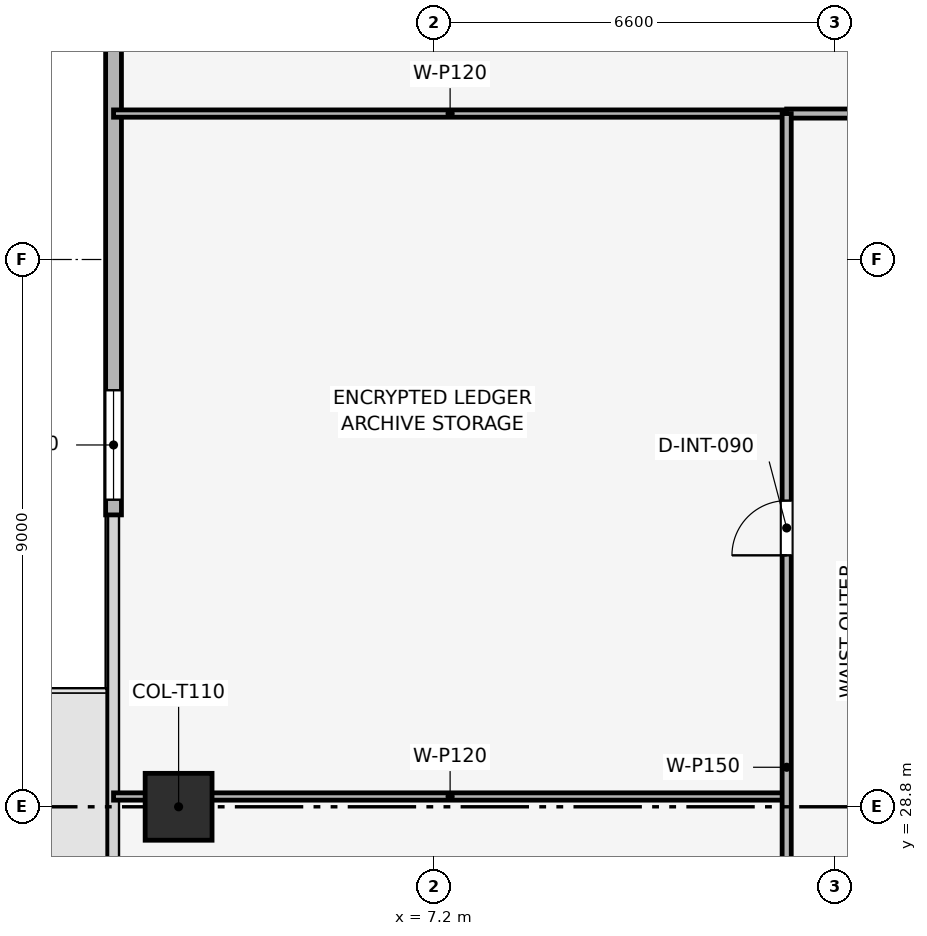
"""IFC4 building model, lengths in metres.
Left out: names, types, materials, properties, quantities, classifications, styles, units other than length and angle.
Written with IfcOpenShell. Run it as: python <this file> out.ifc"""

import sys

from ifc_helpers import new_model, si_unit, direction, frame, frame_2d, origin, origin_2d, place, context, subcontext, project, spatial, rectangle, extrude, element, fill, save


model = new_model("IFC4")
c1 = context("Model", 3, precision=1e-05, world=origin(), true_north=direction((0.0, 1.0)))
c2 = subcontext(c1, "Body", "Model", "MODEL_VIEW")
j1 = project(units=[si_unit("LENGTHUNIT", "METRE"), si_unit("PLANEANGLEUNIT", "RADIAN")], contexts=[c1])
p1 = place(None, origin())
s1 = spatial("IfcSite", under=j1, at=p1, CompositionType="ELEMENT")
p2 = place(p1, origin())
s2 = spatial("IfcBuilding", under=s1, at=p2, CompositionType="ELEMENT")
p3 = place(p2, frame((0.0, 0.0, 237.45)))
s3 = spatial("IfcBuildingStorey", under=s2, at=p3, CompositionType="ELEMENT", Elevation=237.45)
p4 = place(p3, frame((3.0, 28.8, 0.003), z_axis=(0.0, 0.0, 1.0), x_axis=(1.0, 0.0, 0.0)))
e1 = element("IfcColumn", 1, at=p4, inside=s3, PredefinedType="COLUMN", context=c2, shape_type="SweptSolid", body=[
    extrude(rectangle(XDim=1.1, YDim=1.1, at=origin_2d()), origin(), (0.0, 0.0, 1.0), 3.494),
])
p5 = place(p3, frame((1.93, 33.6, 0.0), z_axis=(0.0, 0.0, 1.0), x_axis=(0.0, 1.0, 0.0)))
e2 = element("IfcWall", 2, at=p5, inside=s3, PredefinedType="SOLIDWALL", context=c2, shape_type="SweptSolid", body=[
    extrude(rectangle(XDim=14.7, YDim=0.26, at=frame_2d((7.35, 0.0))), origin(), (0.0, 0.0, 1.0), 3.5),
])
p6 = place(p5, frame((0.25, 0.0, 0.72)))
e3 = element("IfcOpeningElement", 3, at=p6, cuts=e2, PredefinedType="OPENING", context=c2, shape_type="SweptSolid", body=[
    extrude(rectangle(XDim=1.8, YDim=2.1, at=frame_2d((0.9, 1.05))), frame((0.0, 0.14, 0.0), z_axis=(0.0, -1.0, 0.0), x_axis=(1.0, 0.0, 0.0)), (0.0, 0.0, 1.0), 0.28),
])
for number, where, z_axis, x_axis in (
    (4, (1.93, 28.969, 0.0), (0.0, 0.0, 1.0), (1.0, 0.0, 0.0)),
    (5, (1.93, 40.2, 0.0), (0.0, 0.0, 1.0), (1.0, 0.0, 0.0)),
):
    element("IfcWall", number, at=place(p3, frame(where, z_axis=z_axis, x_axis=x_axis)), inside=s3, PredefinedType="PARTITIONING", context=c2, shape_type="SweptSolid", body=[
        extrude(rectangle(XDim=11.07, YDim=0.12, at=frame_2d((5.535, 0.0))), origin(), (0.0, 0.0, 1.0), 2.685),
    ])
p7 = place(p3, frame((13.0, 40.2, 0.0), z_axis=(0.0, 0.0, 1.0), x_axis=(1.0, 0.0, 0.0)))
e6 = element("IfcWall", 6, at=p7, inside=s3, PredefinedType="PARTITIONING", context=c2, shape_type="SweptSolid", body=[
    extrude(rectangle(XDim=31.6, YDim=0.15, at=frame_2d((15.8, 0.0))), origin(), (0.0, 0.0, 1.0), 3.035),
])
p8 = place(p7, frame((5.02, 0.0, 0.0)))
e7 = element("IfcOpeningElement", 7, at=p8, cuts=e6, PredefinedType="OPENING", context=c2, shape_type="SweptSolid", body=[
    extrude(rectangle(XDim=0.9, YDim=2.1, at=frame_2d((0.45, 1.05))), frame((0.0, 0.085, 0.0), z_axis=(0.0, -1.0, 0.0), x_axis=(1.0, 0.0, 0.0)), (0.0, 0.0, 1.0), 0.17),
])
p9 = place(p7, frame((20.82, 0.0, 0.0)))
e8 = element("IfcOpeningElement", 8, at=p9, cuts=e6, PredefinedType="OPENING", context=c2, shape_type="SweptSolid", body=[
    extrude(rectangle(XDim=0.9, YDim=2.1, at=frame_2d((0.45, 1.05))), frame((0.0, 0.085, 0.0), z_axis=(0.0, -1.0, 0.0), x_axis=(1.0, 0.0, 0.0)), (0.0, 0.0, 1.0), 0.17),
])
p10 = place(p3, frame((13.0, 17.4, 0.0), z_axis=(0.0, 0.0, 1.0), x_axis=(0.0, 1.0, 0.0)))
e9 = element("IfcWall", 9, at=p10, inside=s3, PredefinedType="PARTITIONING", context=c2, shape_type="SweptSolid", body=[
    extrude(rectangle(XDim=22.8, YDim=0.15, at=frame_2d((11.4, 0.0))), origin(), (0.0, 0.0, 1.0), 3.035),
])
p11 = place(p10, frame((3.1, 0.0, 0.0)))
e10 = element("IfcOpeningElement", 10, at=p11, cuts=e9, PredefinedType="OPENING", context=c2, shape_type="SweptSolid", body=[
    extrude(rectangle(XDim=0.9, YDim=2.1, at=frame_2d((0.45, 1.05))), frame((0.0, 0.085, 0.0), z_axis=(0.0, -1.0, 0.0), x_axis=(1.0, 0.0, 0.0)), (0.0, 0.0, 1.0), 0.17),
])
p12 = place(p10, frame((7.685, 0.0, 0.0)))
e11 = element("IfcOpeningElement", 11, at=p12, cuts=e9, PredefinedType="OPENING", context=c2, shape_type="SweptSolid", body=[
    extrude(rectangle(XDim=0.9, YDim=2.1, at=frame_2d((0.45, 1.05))), frame((0.0, 0.085, 0.0), z_axis=(0.0, -1.0, 0.0), x_axis=(1.0, 0.0, 0.0)), (0.0, 0.0, 1.0), 0.17),
])
p13 = place(p10, frame((15.535, 0.0, 0.0)))
e12 = element("IfcOpeningElement", 12, at=p13, cuts=e9, PredefinedType="OPENING", context=c2, shape_type="SweptSolid", body=[
    extrude(rectangle(XDim=0.9, YDim=2.1, at=frame_2d((0.45, 1.05))), frame((0.0, 0.085, 0.0), z_axis=(0.0, -1.0, 0.0), x_axis=(1.0, 0.0, 0.0)), (0.0, 0.0, 1.0), 0.17),
])
p14 = place(p6, origin())
e13 = element("IfcWindow", 13, at=p14, inside=s3, PartitioningType="SINGLE_PANEL", PredefinedType="WINDOW", context=c2, shape_type="SweptSolid", body=[
    extrude(rectangle(XDim=1.8, YDim=2.1, at=frame_2d((0.9, 1.05))), frame((0.0, 0.03, 0.0), z_axis=(0.0, -1.0, 0.0), x_axis=(1.0, 0.0, 0.0)), (0.0, 0.0, 1.0), 0.06),
])
fill(e3, e13)
p15 = place(p13, origin())
e14 = element("IfcDoor", 14, at=p15, inside=s3, OperationType="SINGLE_SWING_LEFT", PredefinedType="DOOR", context=c2, shape_type="SweptSolid", body=[
    extrude(rectangle(XDim=0.9, YDim=2.1, at=frame_2d((0.45, 1.05))), frame((0.0, 0.025, 0.0), z_axis=(0.0, -1.0, 0.0), x_axis=(1.0, 0.0, 0.0)), (0.0, 0.0, 1.0), 0.05),
])
fill(e12, e14)
save(model, sys.argv[1])
